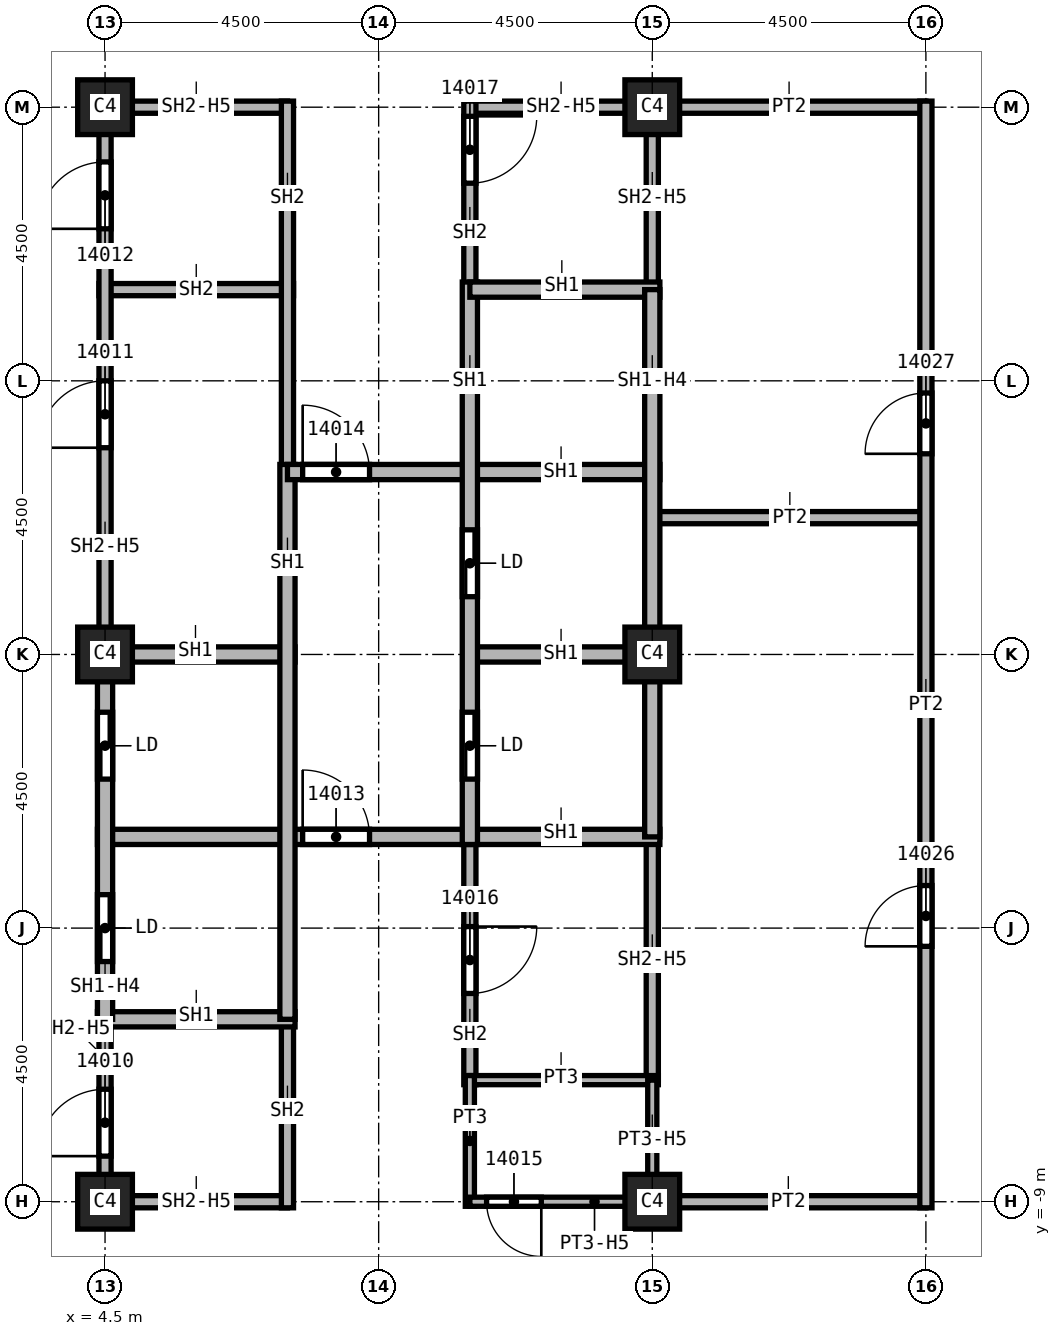
"""IFC4 building model, lengths in metres.
Left out: names, types, materials, properties, quantities, classifications, styles, units other than length and angle.
Written with IfcOpenShell. Run it as: python <this file> out.ifc"""

import sys

from ifc_helpers import new_model, si_unit, direction, frame, frame_2d, origin, origin_2d, place, context, subcontext, project, spatial, rectangle, extrude, element, fill, save


model = new_model("IFC4")
c1 = context("Model", 3, precision=1e-05, world=origin(), true_north=direction((0.0, 1.0)))
c2 = subcontext(c1, "Body", "Model", "MODEL_VIEW")
j1 = project(units=[si_unit("LENGTHUNIT", "METRE"), si_unit("PLANEANGLEUNIT", "RADIAN")], contexts=[c1])
p1 = place(None, origin())
s1 = spatial("IfcSite", under=j1, at=p1, CompositionType="ELEMENT")
p2 = place(p1, origin())
s2 = spatial("IfcBuilding", under=s1, at=p2, CompositionType="ELEMENT")
p3 = place(p2, frame((0.0, 0.0, 220.0)))
s3 = spatial("IfcBuildingStorey", under=s2, at=p3, CompositionType="ELEMENT", Elevation=220.0)
for number, where, z_axis, x_axis in (
    (1, (4.5, 0.0, 0.0), (0.0, 0.0, 1.0), (1.0, 0.0, 0.0)),
    (2, (4.5, 9.0, 0.0), (0.0, 0.0, 1.0), (1.0, 0.0, 0.0)),
    (3, (4.5, -9.0, 0.0), (0.0, 0.0, 1.0), (1.0, 0.0, 0.0)),
    (4, (13.5, 0.0, 0.0), (0.0, 0.0, 1.0), (1.0, 0.0, 0.0)),
    (5, (13.5, 9.0, 0.0), (0.0, 0.0, 1.0), (1.0, 0.0, 0.0)),
    (6, (13.5, -9.0, 0.0), (0.0, 0.0, 1.0), (1.0, 0.0, 0.0)),
):
    element("IfcColumn", number, at=place(p3, frame(where, z_axis=z_axis, x_axis=x_axis)), inside=s3, PredefinedType="COLUMN", context=c2, shape_type="SweptSolid", body=[
        extrude(rectangle(XDim=0.9, YDim=0.9, at=origin_2d()), origin(), (0.0, 0.0, 1.0), 3.72),
    ])
for number, where, z_axis, x_axis in (
    (7, (13.5, -9.0, 0.0), (0.0, 0.0, 1.0), (1.0, 0.0, 0.0)),
    (8, (13.5, 2.25, 0.0), (0.0, 0.0, 1.0), (1.0, 0.0, 0.0)),
    (9, (18.0, 9.0, 0.0), (0.0, 0.0, 1.0), (-1.0, 0.0, 0.0)),
):
    element("IfcWall", number, at=place(p3, frame(where, z_axis=z_axis, x_axis=x_axis)), inside=s3, PredefinedType="PARTITIONING", context=c2, shape_type="SweptSolid", body=[
        extrude(rectangle(XDim=4.5, YDim=0.2, at=frame_2d((2.25, 0.0))), origin(), (0.0, 0.0, 1.0), 3.72),
    ])
p4 = place(p3, frame((18.0, -9.1, 0.0), z_axis=(0.0, 0.0, 1.0), x_axis=(0.0, 1.0, 0.0)))
e10 = element("IfcWall", 10, at=p4, inside=s3, PredefinedType="PARTITIONING", context=c2, shape_type="SweptSolid", body=[
    extrude(rectangle(XDim=18.2, YDim=0.2, at=frame_2d((9.1, 0.0))), origin(), (0.0, 0.0, 1.0), 3.72),
])
p5 = place(p4, frame((4.3, 0.0, 0.0)))
e11 = element("IfcOpeningElement", 11, at=p5, cuts=e10, PredefinedType="OPENING", context=c2, shape_type="SweptSolid", body=[
    extrude(rectangle(XDim=1.0, YDim=2.1, at=frame_2d((0.5, 1.05))), frame((0.0, 0.1, 0.0), z_axis=(0.0, -1.0, 0.0), x_axis=(1.0, 0.0, 0.0)), (0.0, 0.0, 1.0), 0.2),
])
p6 = place(p4, frame((12.4, 0.0, 0.0)))
e12 = element("IfcOpeningElement", 12, at=p6, cuts=e10, PredefinedType="OPENING", context=c2, shape_type="SweptSolid", body=[
    extrude(rectangle(XDim=1.0, YDim=2.1, at=frame_2d((0.5, 1.05))), frame((0.0, 0.1, 0.0), z_axis=(0.0, -1.0, 0.0), x_axis=(1.0, 0.0, 0.0)), (0.0, 0.0, 1.0), 0.2),
])
p7 = place(p3, frame((4.4, 6.0, 0.0), z_axis=(0.0, 0.0, 1.0), x_axis=(1.0, 0.0, 0.0)))
e13 = element("IfcWall", 13, at=p7, inside=s3, PredefinedType="SOLIDWALL", context=c2, shape_type="SweptSolid", body=[
    extrude(rectangle(XDim=3.2, YDim=0.2, at=frame_2d((1.6, 0.0))), origin(), (0.0, 0.0, 1.0), 3.72),
])
p8 = place(p3, frame((4.5, -9.1, 0.0), z_axis=(0.0, 0.0, 1.0), x_axis=(0.0, 1.0, 0.0)))
e14 = element("IfcWall", 14, at=p8, inside=s3, PredefinedType="SOLIDWALL", context=c2, shape_type="SweptSolid", body=[
    extrude(rectangle(XDim=3.1, YDim=0.2, at=frame_2d((1.55, 0.0))), origin(), (0.0, 0.0, 1.0), 2.958),
])
p9 = place(p8, frame((0.85, 0.0, 0.0)))
e15 = element("IfcOpeningElement", 15, at=p9, cuts=e14, PredefinedType="OPENING", context=c2, shape_type="SweptSolid", body=[
    extrude(rectangle(XDim=1.1, YDim=2.1, at=frame_2d((0.55, 1.05))), frame((0.0, 0.1, 0.0), z_axis=(0.0, -1.0, 0.0), x_axis=(1.0, 0.0, 0.0)), (0.0, 0.0, 1.0), 0.2),
])
p10 = place(p3, frame((4.5, 0.0, 0.0), z_axis=(0.0, 0.0, 1.0), x_axis=(0.0, 1.0, 0.0)))
e16 = element("IfcWall", 16, at=p10, inside=s3, PredefinedType="SOLIDWALL", context=c2, shape_type="SweptSolid", body=[
    extrude(rectangle(XDim=9.1, YDim=0.2, at=frame_2d((4.55, 0.0))), origin(), (0.0, 0.0, 1.0), 2.958),
])
p11 = place(p10, frame((3.4, 0.0, 0.0)))
e17 = element("IfcOpeningElement", 17, at=p11, cuts=e16, PredefinedType="OPENING", context=c2, shape_type="SweptSolid", body=[
    extrude(rectangle(XDim=1.1, YDim=2.1, at=frame_2d((0.55, 1.05))), frame((0.0, 0.1, 0.0), z_axis=(0.0, -1.0, 0.0), x_axis=(1.0, 0.0, 0.0)), (0.0, 0.0, 1.0), 0.2),
])
p12 = place(p10, frame((7.0, 0.0, 0.0)))
e18 = element("IfcOpeningElement", 18, at=p12, cuts=e16, PredefinedType="OPENING", context=c2, shape_type="SweptSolid", body=[
    extrude(rectangle(XDim=1.1, YDim=2.1, at=frame_2d((0.55, 1.05))), frame((0.0, 0.1, 0.0), z_axis=(0.0, -1.0, 0.0), x_axis=(1.0, 0.0, 0.0)), (0.0, 0.0, 1.0), 0.2),
])
for number, where, z_axis, x_axis in (
    (19, (4.5, 9.0, 0.0), (0.0, 0.0, 1.0), (1.0, 0.0, 0.0)),
    (20, (7.5, -9.0, 0.0), (0.0, 0.0, 1.0), (-1.0, 0.0, 0.0)),
):
    element("IfcWall", number, at=place(p3, frame(where, z_axis=z_axis, x_axis=x_axis)), inside=s3, PredefinedType="SOLIDWALL", context=c2, shape_type="SweptSolid", body=[
        extrude(rectangle(XDim=3.0, YDim=0.2, at=frame_2d((1.5, 0.0))), origin(), (0.0, 0.0, 1.0), 2.958),
    ])
p13 = place(p3, frame((7.5, -6.0, 0.0), z_axis=(0.0, 0.0, 1.0), x_axis=(0.0, -1.0, 0.0)))
e21 = element("IfcWall", 21, at=p13, inside=s3, PredefinedType="SOLIDWALL", context=c2, shape_type="SweptSolid", body=[
    extrude(rectangle(XDim=3.1, YDim=0.2, at=frame_2d((1.55, 0.0))), origin(), (0.0, 0.0, 1.0), 3.72),
])
p14 = place(p3, frame((7.5, 9.1, 0.0), z_axis=(0.0, 0.0, 1.0), x_axis=(0.0, -1.0, 0.0)))
e22 = element("IfcWall", 22, at=p14, inside=s3, PredefinedType="SOLIDWALL", context=c2, shape_type="SweptSolid", body=[
    extrude(rectangle(XDim=6.225, YDim=0.2, at=frame_2d((3.113, 0.0))), origin(), (0.0, 0.0, 1.0), 3.72),
])
p15 = place(p3, frame((10.5, -2.875, 0.0), z_axis=(0.0, 0.0, 1.0), x_axis=(0.0, -1.0, 0.0)))
e23 = element("IfcWall", 23, at=p15, inside=s3, PredefinedType="SOLIDWALL", context=c2, shape_type="SweptSolid", body=[
    extrude(rectangle(XDim=4.2, YDim=0.2, at=frame_2d((2.1, 0.0))), origin(), (0.0, 0.0, 1.0), 3.72),
])
p16 = place(p15, frame((1.6, 0.0, 0.0)))
e24 = element("IfcOpeningElement", 24, at=p16, cuts=e23, PredefinedType="OPENING", context=c2, shape_type="SweptSolid", body=[
    extrude(rectangle(XDim=1.1, YDim=2.1, at=frame_2d((0.55, 1.05))), frame((0.0, 0.1, 0.0), z_axis=(0.0, -1.0, 0.0), x_axis=(1.0, 0.0, 0.0)), (0.0, 0.0, 1.0), 0.2),
])
p17 = place(p3, frame((10.5, 9.0, 0.0), z_axis=(0.0, 0.0, 1.0), x_axis=(1.0, 0.0, 0.0)))
e25 = element("IfcWall", 25, at=p17, inside=s3, PredefinedType="SOLIDWALL", context=c2, shape_type="SweptSolid", body=[
    extrude(rectangle(XDim=3.1, YDim=0.2, at=frame_2d((1.55, 0.0))), origin(), (0.0, 0.0, 1.0), 2.958),
])
p18 = place(p3, frame((10.5, 9.1, 0.0), z_axis=(0.0, 0.0, 1.0), x_axis=(0.0, -1.0, 0.0)))
e26 = element("IfcWall", 26, at=p18, inside=s3, PredefinedType="SOLIDWALL", context=c2, shape_type="SweptSolid", body=[
    extrude(rectangle(XDim=3.225, YDim=0.2, at=frame_2d((1.613, 0.0))), origin(), (0.0, 0.0, 1.0), 3.72),
])
p19 = place(p18, frame((0.25, 0.0, 0.0)))
e27 = element("IfcOpeningElement", 27, at=p19, cuts=e26, PredefinedType="OPENING", context=c2, shape_type="SweptSolid", body=[
    extrude(rectangle(XDim=1.1, YDim=2.1, at=frame_2d((0.55, 1.05))), frame((0.0, 0.1, 0.0), z_axis=(0.0, -1.0, 0.0), x_axis=(1.0, 0.0, 0.0)), (0.0, 0.0, 1.0), 0.2),
])
p20 = place(p3, frame((13.5, -3.0, 0.0), z_axis=(0.0, 0.0, 1.0), x_axis=(0.0, -1.0, 0.0)))
e28 = element("IfcWall", 28, at=p20, inside=s3, PredefinedType="SOLIDWALL", context=c2, shape_type="SweptSolid", body=[
    extrude(rectangle(XDim=4.0, YDim=0.2, at=frame_2d((2.0, 0.0))), origin(), (0.0, 0.0, 1.0), 2.958),
])
p21 = place(p3, frame((13.5, 9.1, 0.0), z_axis=(0.0, 0.0, 1.0), x_axis=(0.0, -1.0, 0.0)))
e29 = element("IfcWall", 29, at=p21, inside=s3, PredefinedType="SOLIDWALL", context=c2, shape_type="SweptSolid", body=[
    extrude(rectangle(XDim=3.1, YDim=0.2, at=frame_2d((1.55, 0.0))), origin(), (0.0, 0.0, 1.0), 2.958),
])
p22 = place(p3, frame((4.375, -6.0, 0.0), z_axis=(0.0, 0.0, 1.0), x_axis=(1.0, 0.0, 0.0)))
e30 = element("IfcWall", 30, at=p22, inside=s3, PredefinedType="SOLIDWALL", context=c2, shape_type="SweptSolid", body=[
    extrude(rectangle(XDim=3.25, YDim=0.25, at=frame_2d((1.625, 0.0))), origin(), (0.0, 0.0, 1.0), 3.72),
])
p23 = place(p3, frame((4.375, -3.0, 0.0), z_axis=(0.0, 0.0, 1.0), x_axis=(1.0, 0.0, 0.0)))
e31 = element("IfcWall", 31, at=p23, inside=s3, PredefinedType="SOLIDWALL", context=c2, shape_type="SweptSolid", body=[
    extrude(rectangle(XDim=9.25, YDim=0.25, at=frame_2d((4.625, 0.0))), origin(), (0.0, 0.0, 1.0), 3.72),
])
p24 = place(p23, frame((3.375, 0.0, 0.0)))
e32 = element("IfcOpeningElement", 32, at=p24, cuts=e31, PredefinedType="OPENING", context=c2, shape_type="SweptSolid", body=[
    extrude(rectangle(XDim=1.1, YDim=2.1, at=frame_2d((0.55, 1.05))), frame((0.0, 0.125, 0.0), z_axis=(0.0, -1.0, 0.0), x_axis=(1.0, 0.0, 0.0)), (0.0, 0.0, 1.0), 0.25),
])
p25 = place(p3, frame((4.375, 0.0, 0.0), z_axis=(0.0, 0.0, 1.0), x_axis=(1.0, 0.0, 0.0)))
e33 = element("IfcWall", 33, at=p25, inside=s3, PredefinedType="SOLIDWALL", context=c2, shape_type="SweptSolid", body=[
    extrude(rectangle(XDim=3.25, YDim=0.25, at=frame_2d((1.625, 0.0))), origin(), (0.0, 0.0, 1.0), 3.72),
])
p26 = place(p3, frame((4.5, -6.0, 0.0), z_axis=(0.0, 0.0, 1.0), x_axis=(0.0, 1.0, 0.0)))
e34 = element("IfcWall", 34, at=p26, inside=s3, PredefinedType="SOLIDWALL", context=c2, shape_type="SweptSolid", body=[
    extrude(rectangle(XDim=6.0, YDim=0.25, at=frame_2d((3.0, 0.0))), origin(), (0.0, 0.0, 1.0), 2.958),
])
p27 = place(p26, frame((0.95, 0.0, 0.0)))
e35 = element("IfcOpeningElement", 35, at=p27, cuts=e34, PredefinedType="OPENING", context=c2, shape_type="SweptSolid", body=[
    extrude(rectangle(XDim=1.1, YDim=2.1, at=frame_2d((0.55, 1.05))), frame((0.0, 0.125, 0.0), z_axis=(0.0, -1.0, 0.0), x_axis=(1.0, 0.0, 0.0)), (0.0, 0.0, 1.0), 0.25),
])
p28 = place(p26, frame((3.95, 0.0, 0.0)))
e36 = element("IfcOpeningElement", 36, at=p28, cuts=e34, PredefinedType="OPENING", context=c2, shape_type="SweptSolid", body=[
    extrude(rectangle(XDim=1.1, YDim=2.1, at=frame_2d((0.55, 1.05))), frame((0.0, 0.125, 0.0), z_axis=(0.0, -1.0, 0.0), x_axis=(1.0, 0.0, 0.0)), (0.0, 0.0, 1.0), 0.25),
])
p29 = place(p3, frame((7.5, 3.125, 0.0), z_axis=(0.0, 0.0, 1.0), x_axis=(0.0, -1.0, 0.0)))
e37 = element("IfcWall", 37, at=p29, inside=s3, PredefinedType="SOLIDWALL", context=c2, shape_type="SweptSolid", body=[
    extrude(rectangle(XDim=9.125, YDim=0.25, at=frame_2d((4.562, 0.0))), origin(), (0.0, 0.0, 1.0), 3.72),
])
p30 = place(p3, frame((7.5, 3.0, 0.0), z_axis=(0.0, 0.0, 1.0), x_axis=(1.0, 0.0, 0.0)))
e38 = element("IfcWall", 38, at=p30, inside=s3, PredefinedType="SOLIDWALL", context=c2, shape_type="SweptSolid", body=[
    extrude(rectangle(XDim=6.125, YDim=0.25, at=frame_2d((3.062, 0.0))), origin(), (0.0, 0.0, 1.0), 3.72),
])
p31 = place(p30, frame((0.25, 0.0, 0.0)))
e39 = element("IfcOpeningElement", 39, at=p31, cuts=e38, PredefinedType="OPENING", context=c2, shape_type="SweptSolid", body=[
    extrude(rectangle(XDim=1.1, YDim=2.1, at=frame_2d((0.55, 1.05))), frame((0.0, 0.125, 0.0), z_axis=(0.0, -1.0, 0.0), x_axis=(1.0, 0.0, 0.0)), (0.0, 0.0, 1.0), 0.25),
])
p32 = place(p3, frame((10.5, 0.0, 0.0), z_axis=(0.0, 0.0, 1.0), x_axis=(1.0, 0.0, 0.0)))
e40 = element("IfcWall", 40, at=p32, inside=s3, PredefinedType="SOLIDWALL", context=c2, shape_type="SweptSolid", body=[
    extrude(rectangle(XDim=3.125, YDim=0.25, at=frame_2d((1.562, 0.0))), origin(), (0.0, 0.0, 1.0), 3.72),
])
p33 = place(p3, frame((10.5, 6.125, 0.0), z_axis=(0.0, 0.0, 1.0), x_axis=(0.0, -1.0, 0.0)))
e41 = element("IfcWall", 41, at=p33, inside=s3, PredefinedType="SOLIDWALL", context=c2, shape_type="SweptSolid", body=[
    extrude(rectangle(XDim=9.25, YDim=0.25, at=frame_2d((4.625, 0.0))), origin(), (0.0, 0.0, 1.0), 3.72),
])
p34 = place(p33, frame((7.075, 0.0, 0.0)))
e42 = element("IfcOpeningElement", 42, at=p34, cuts=e41, PredefinedType="OPENING", context=c2, shape_type="SweptSolid", body=[
    extrude(rectangle(XDim=1.1, YDim=2.1, at=frame_2d((0.55, 1.05))), frame((0.0, 0.125, 0.0), z_axis=(0.0, -1.0, 0.0), x_axis=(1.0, 0.0, 0.0)), (0.0, 0.0, 1.0), 0.25),
])
p35 = place(p33, frame((4.075, 0.0, 0.0)))
e43 = element("IfcOpeningElement", 43, at=p35, cuts=e41, PredefinedType="OPENING", context=c2, shape_type="SweptSolid", body=[
    extrude(rectangle(XDim=1.1, YDim=2.1, at=frame_2d((0.55, 1.05))), frame((0.0, 0.125, 0.0), z_axis=(0.0, -1.0, 0.0), x_axis=(1.0, 0.0, 0.0)), (0.0, 0.0, 1.0), 0.25),
])
p36 = place(p3, frame((10.5, 6.0, 0.0), z_axis=(0.0, 0.0, 1.0), x_axis=(1.0, 0.0, 0.0)))
e44 = element("IfcWall", 44, at=p36, inside=s3, PredefinedType="SOLIDWALL", context=c2, shape_type="SweptSolid", body=[
    extrude(rectangle(XDim=3.125, YDim=0.25, at=frame_2d((1.562, 0.0))), origin(), (0.0, 0.0, 1.0), 3.72),
])
p37 = place(p3, frame((13.5, 6.0, 0.0), z_axis=(0.0, 0.0, 1.0), x_axis=(0.0, -1.0, 0.0)))
e45 = element("IfcWall", 45, at=p37, inside=s3, PredefinedType="SOLIDWALL", context=c2, shape_type="SweptSolid", body=[
    extrude(rectangle(XDim=9.0, YDim=0.25, at=frame_2d((4.5, 0.0))), origin(), (0.0, 0.0, 1.0), 2.958),
])
p38 = place(p3, frame((10.5, -7.0, 0.0), z_axis=(0.0, 0.0, 1.0), x_axis=(1.0, 0.0, 0.0)))
e46 = element("IfcWall", 46, at=p38, inside=s3, PredefinedType="PARTITIONING", context=c2, shape_type="SweptSolid", body=[
    extrude(rectangle(XDim=3.1, YDim=0.15, at=frame_2d((1.55, 0.0))), origin(), (0.0, 0.0, 1.0), 3.72),
])
p39 = place(p3, frame((10.5, -6.925, 0.0), z_axis=(0.0, 0.0, 1.0), x_axis=(0.0, -1.0, 0.0)))
e47 = element("IfcWall", 47, at=p39, inside=s3, PredefinedType="PARTITIONING", context=c2, shape_type="SweptSolid", body=[
    extrude(rectangle(XDim=2.15, YDim=0.15, at=frame_2d((1.075, 0.0))), origin(), (0.0, 0.0, 1.0), 3.72),
])
p40 = place(p3, frame((13.5, -7.0, 0.0), z_axis=(0.0, 0.0, 1.0), x_axis=(0.0, -1.0, 0.0)))
e48 = element("IfcWall", 48, at=p40, inside=s3, PredefinedType="PARTITIONING", context=c2, shape_type="SweptSolid", body=[
    extrude(rectangle(XDim=2.1, YDim=0.15, at=frame_2d((1.05, 0.0))), origin(), (0.0, 0.0, 1.0), 2.958),
])
p41 = place(p3, frame((13.575, -9.0, 0.0), z_axis=(0.0, 0.0, 1.0), x_axis=(-1.0, 0.0, 0.0)))
e49 = element("IfcWall", 49, at=p41, inside=s3, PredefinedType="PARTITIONING", context=c2, shape_type="SweptSolid", body=[
    extrude(rectangle(XDim=3.075, YDim=0.15, at=frame_2d((1.538, 0.0))), origin(), (0.0, 0.0, 1.0), 2.958),
])
p42 = place(p41, frame((1.9, 0.0, 0.0)))
e50 = element("IfcOpeningElement", 50, at=p42, cuts=e49, PredefinedType="OPENING", context=c2, shape_type="SweptSolid", body=[
    extrude(rectangle(XDim=0.9, YDim=2.1, at=frame_2d((0.45, 1.05))), frame((0.0, 0.075, 0.0), z_axis=(0.0, -1.0, 0.0), x_axis=(1.0, 0.0, 0.0)), (0.0, 0.0, 1.0), 0.15),
])
p43 = place(p9, origin())
e51 = element("IfcDoor", 51, at=p43, inside=s3, OperationType="SINGLE_SWING_LEFT", PredefinedType="DOOR", context=c2, shape_type="SweptSolid", body=[
    extrude(rectangle(XDim=1.1, YDim=2.1, at=frame_2d((0.55, 1.05))), frame((0.0, 0.025, 0.0), z_axis=(0.0, -1.0, 0.0), x_axis=(1.0, 0.0, 0.0)), (0.0, 0.0, 1.0), 0.05),
])
fill(e15, e51)
p44 = place(p11, origin())
e52 = element("IfcDoor", 52, at=p44, inside=s3, OperationType="SINGLE_SWING_RIGHT", PredefinedType="DOOR", context=c2, shape_type="SweptSolid", body=[
    extrude(rectangle(XDim=1.1, YDim=2.1, at=frame_2d((0.55, 1.05))), frame((0.0, 0.025, 0.0), z_axis=(0.0, -1.0, 0.0), x_axis=(1.0, 0.0, 0.0)), (0.0, 0.0, 1.0), 0.05),
])
fill(e17, e52)
p45 = place(p12, origin())
e53 = element("IfcDoor", 53, at=p45, inside=s3, OperationType="SINGLE_SWING_LEFT", PredefinedType="DOOR", context=c2, shape_type="SweptSolid", body=[
    extrude(rectangle(XDim=1.1, YDim=2.1, at=frame_2d((0.55, 1.05))), frame((0.0, 0.025, 0.0), z_axis=(0.0, -1.0, 0.0), x_axis=(1.0, 0.0, 0.0)), (0.0, 0.0, 1.0), 0.05),
])
fill(e18, e53)
p46 = place(p24, origin())
e54 = element("IfcDoor", 54, at=p46, inside=s3, OperationType="SINGLE_SWING_RIGHT", PredefinedType="DOOR", context=c2, shape_type="SweptSolid", body=[
    extrude(rectangle(XDim=1.1, YDim=2.1, at=frame_2d((0.55, 1.05))), frame((0.0, 0.025, 0.0), z_axis=(0.0, -1.0, 0.0), x_axis=(1.0, 0.0, 0.0)), (0.0, 0.0, 1.0), 0.05),
])
fill(e32, e54)
p47 = place(p31, origin())
e55 = element("IfcDoor", 55, at=p47, inside=s3, OperationType="SINGLE_SWING_LEFT", PredefinedType="DOOR", context=c2, shape_type="SweptSolid", body=[
    extrude(rectangle(XDim=1.1, YDim=2.1, at=frame_2d((0.55, 1.05))), frame((0.0, 0.025, 0.0), z_axis=(0.0, -1.0, 0.0), x_axis=(1.0, 0.0, 0.0)), (0.0, 0.0, 1.0), 0.05),
])
fill(e39, e55)
p48 = place(p42, origin())
e56 = element("IfcDoor", 56, at=p48, inside=s3, OperationType="SINGLE_SWING_RIGHT", PredefinedType="DOOR", context=c2, shape_type="SweptSolid", body=[
    extrude(rectangle(XDim=0.9, YDim=2.1, at=frame_2d((0.45, 1.05))), frame((0.0, 0.025, 0.0), z_axis=(0.0, -1.0, 0.0), x_axis=(1.0, 0.0, 0.0)), (0.0, 0.0, 1.0), 0.05),
])
fill(e50, e56)
p49 = place(p16, origin())
e57 = element("IfcDoor", 57, at=p49, inside=s3, OperationType="SINGLE_SWING_LEFT", PredefinedType="DOOR", context=c2, shape_type="SweptSolid", body=[
    extrude(rectangle(XDim=1.1, YDim=2.1, at=frame_2d((0.55, 1.05))), frame((0.0, 0.025, 0.0), z_axis=(0.0, -1.0, 0.0), x_axis=(1.0, 0.0, 0.0)), (0.0, 0.0, 1.0), 0.05),
])
fill(e24, e57)
p50 = place(p19, origin())
e58 = element("IfcDoor", 58, at=p50, inside=s3, OperationType="SINGLE_SWING_RIGHT", PredefinedType="DOOR", context=c2, shape_type="SweptSolid", body=[
    extrude(rectangle(XDim=1.1, YDim=2.1, at=frame_2d((0.55, 1.05))), frame((0.0, 0.025, 0.0), z_axis=(0.0, -1.0, 0.0), x_axis=(1.0, 0.0, 0.0)), (0.0, 0.0, 1.0), 0.05),
])
fill(e27, e58)
p51 = place(p5, origin())
e59 = element("IfcDoor", 59, at=p51, inside=s3, OperationType="SINGLE_SWING_LEFT", PredefinedType="DOOR", context=c2, shape_type="SweptSolid", body=[
    extrude(rectangle(XDim=1.0, YDim=2.1, at=frame_2d((0.5, 1.05))), frame((0.0, 0.025, 0.0), z_axis=(0.0, -1.0, 0.0), x_axis=(1.0, 0.0, 0.0)), (0.0, 0.0, 1.0), 0.05),
])
fill(e11, e59)
p52 = place(p6, origin())
e60 = element("IfcDoor", 60, at=p52, inside=s3, OperationType="SINGLE_SWING_RIGHT", PredefinedType="DOOR", context=c2, shape_type="SweptSolid", body=[
    extrude(rectangle(XDim=1.0, YDim=2.1, at=frame_2d((0.5, 1.05))), frame((0.0, 0.025, 0.0), z_axis=(0.0, -1.0, 0.0), x_axis=(1.0, 0.0, 0.0)), (0.0, 0.0, 1.0), 0.05),
])
fill(e12, e60)
p53 = place(p27, origin())
e61 = element("IfcDoor", 61, at=p53, inside=s3, OperationType="SLIDING_TO_LEFT", PredefinedType="DOOR", context=c2, shape_type="SweptSolid", body=[
    extrude(rectangle(XDim=1.1, YDim=2.1, at=frame_2d((0.55, 1.05))), frame((0.0, 0.025, 0.0), z_axis=(0.0, -1.0, 0.0), x_axis=(1.0, 0.0, 0.0)), (0.0, 0.0, 1.0), 0.05),
])
fill(e35, e61)
p54 = place(p28, origin())
e62 = element("IfcDoor", 62, at=p54, inside=s3, OperationType="SLIDING_TO_LEFT", PredefinedType="DOOR", context=c2, shape_type="SweptSolid", body=[
    extrude(rectangle(XDim=1.1, YDim=2.1, at=frame_2d((0.55, 1.05))), frame((0.0, 0.025, 0.0), z_axis=(0.0, -1.0, 0.0), x_axis=(1.0, 0.0, 0.0)), (0.0, 0.0, 1.0), 0.05),
])
fill(e36, e62)
p55 = place(p34, origin())
e63 = element("IfcDoor", 63, at=p55, inside=s3, OperationType="SLIDING_TO_LEFT", PredefinedType="DOOR", context=c2, shape_type="SweptSolid", body=[
    extrude(rectangle(XDim=1.1, YDim=2.1, at=frame_2d((0.55, 1.05))), frame((0.0, 0.025, 0.0), z_axis=(0.0, -1.0, 0.0), x_axis=(1.0, 0.0, 0.0)), (0.0, 0.0, 1.0), 0.05),
])
fill(e42, e63)
p56 = place(p35, origin())
e64 = element("IfcDoor", 64, at=p56, inside=s3, OperationType="SLIDING_TO_LEFT", PredefinedType="DOOR", context=c2, shape_type="SweptSolid", body=[
    extrude(rectangle(XDim=1.1, YDim=2.1, at=frame_2d((0.55, 1.05))), frame((0.0, 0.025, 0.0), z_axis=(0.0, -1.0, 0.0), x_axis=(1.0, 0.0, 0.0)), (0.0, 0.0, 1.0), 0.05),
])
fill(e43, e64)
save(model, sys.argv[1])
